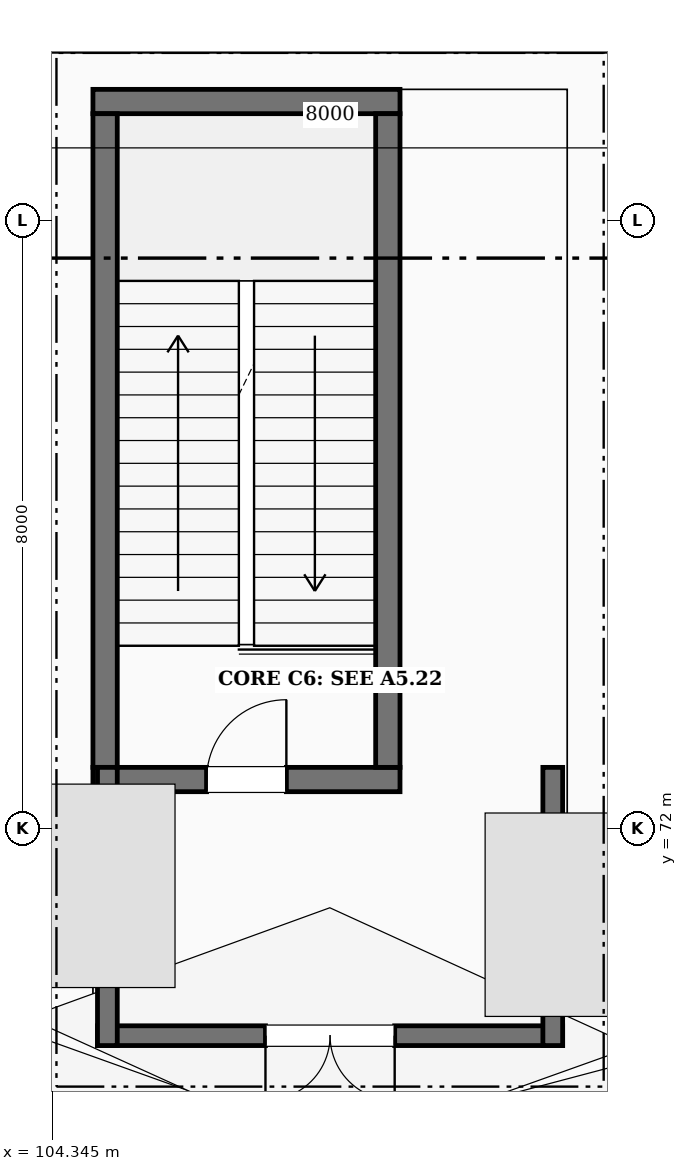
"""IFC4 building model, lengths in metres.
Left out: names, types, materials, properties, quantities, classifications, styles, units other than length and angle.
Written with IfcOpenShell. Run it as: python <this file> out.ifc"""

import sys

from ifc_helpers import new_model, si_unit, direction, frame, frame_2d, origin, place, context, subcontext, project, spatial, rectangle, extrude, element, fill, save


model = new_model("IFC4")
c1 = context("Model", 3, precision=1e-05, world=origin(), true_north=direction((0.0, 1.0)))
c2 = subcontext(c1, "Body", "Model", "MODEL_VIEW")
j1 = project(units=[si_unit("LENGTHUNIT", "METRE"), si_unit("PLANEANGLEUNIT", "RADIAN")], contexts=[c1])
p1 = place(None, origin())
s1 = spatial("IfcSite", under=j1, at=p1, CompositionType="ELEMENT")
p2 = place(p1, origin())
s2 = spatial("IfcBuilding", under=s1, at=p2, CompositionType="ELEMENT")
p3 = place(p2, frame((0.0, 0.0, 10.8)))
s3 = spatial("IfcBuildingStorey", under=s2, at=p3, CompositionType="ELEMENT", Elevation=10.8)
p4 = place(p3, frame((104.88, 72.64, 0.0), z_axis=(0.0, 0.0, 1.0), x_axis=(1.0, 0.0, 0.0)))
e1 = element("IfcWall", 1, at=p4, inside=s3, PredefinedType="SHEAR", context=c2, shape_type="SweptSolid", body=[
    extrude(rectangle(XDim=4.04, YDim=0.32, at=frame_2d((2.02, 0.0))), origin(), (0.0, 0.0, 1.0), 2.65),
])
p5 = place(p4, frame((1.495, 0.0, 0.0)))
e2 = element("IfcOpeningElement", 2, at=p5, cuts=e1, PredefinedType="OPENING", context=c2, shape_type="SweptSolid", body=[
    extrude(rectangle(XDim=1.05, YDim=2.15, at=frame_2d((0.525, 1.075))), frame((0.0, 0.17, 0.0), z_axis=(0.0, -1.0, 0.0), x_axis=(1.0, 0.0, 0.0)), (0.0, 0.0, 1.0), 0.34),
])
p6 = place(p3, frame((104.88, 81.56, 0.0), z_axis=(0.0, 0.0, 1.0), x_axis=(1.0, 0.0, 0.0)))
e3 = element("IfcWall", 3, at=p6, inside=s3, PredefinedType="SHEAR", context=c2, shape_type="SweptSolid", body=[
    extrude(rectangle(XDim=4.04, YDim=0.32, at=frame_2d((2.02, 0.0))), origin(), (0.0, 0.0, 1.0), 2.65),
])
for number, where, z_axis, x_axis in (
    (4, (105.04, 72.8, 0.0), (0.0, 0.0, 1.0), (0.0, 1.0, 0.0)),
    (5, (108.76, 72.8, 0.0), (0.0, 0.0, 1.0), (0.0, 1.0, 0.0)),
):
    element("IfcWall", number, at=place(p3, frame(where, z_axis=z_axis, x_axis=x_axis)), inside=s3, PredefinedType="SHEAR", context=c2, shape_type="SweptSolid", body=[
        extrude(rectangle(XDim=8.6, YDim=0.32, at=frame_2d((4.3, 0.0))), origin(), (0.0, 0.0, 1.0), 2.65),
    ])
p7 = place(p3, frame((111.06, 69.27, 0.0), z_axis=(0.0, 0.0, 1.0), x_axis=(-1.0, 0.0, 0.0)))
e6 = element("IfcWall", 6, at=p7, inside=s3, PredefinedType="SHEAR", context=c2, shape_type="SweptSolid", body=[
    extrude(rectangle(XDim=6.12, YDim=0.26, at=frame_2d((3.06, 0.0))), origin(), (0.0, 0.0, 1.0), 2.65),
])
p8 = place(p7, frame((2.21, 0.0, 0.0)))
e7 = element("IfcOpeningElement", 7, at=p8, cuts=e6, PredefinedType="OPENING", context=c2, shape_type="SweptSolid", body=[
    extrude(rectangle(XDim=1.7, YDim=2.2, at=frame_2d((0.85, 1.1))), frame((0.0, 0.14, 0.0), z_axis=(0.0, -1.0, 0.0), x_axis=(1.0, 0.0, 0.0)), (0.0, 0.0, 1.0), 0.28),
])
for number, where, z_axis, x_axis in (
    (8, (105.07, 69.14, 0.0), (0.0, 0.0, 1.0), (0.0, 1.0, 0.0)),
    (9, (110.93, 69.14, 0.0), (0.0, 0.0, 1.0), (0.0, 1.0, 0.0)),
):
    element("IfcWall", number, at=place(p3, frame(where, z_axis=z_axis, x_axis=x_axis)), inside=s3, PredefinedType="SHEAR", context=c2, shape_type="SweptSolid", body=[
        extrude(rectangle(XDim=3.66, YDim=0.26, at=frame_2d((1.83, 0.0))), origin(), (0.0, 0.0, 1.0), 2.65),
    ])
p9 = place(p5, origin())
e10 = element("IfcDoor", 10, at=p9, inside=s3, OperationType="SINGLE_SWING_RIGHT", PredefinedType="DOOR", context=c2, shape_type="SweptSolid", body=[
    extrude(rectangle(XDim=1.05, YDim=2.15, at=frame_2d((0.525, 1.075))), frame((0.0, 0.025, 0.0), z_axis=(0.0, -1.0, 0.0), x_axis=(1.0, 0.0, 0.0)), (0.0, 0.0, 1.0), 0.05),
])
fill(e2, e10)
p10 = place(p8, origin())
e11 = element("IfcDoor", 11, at=p10, inside=s3, OperationType="DOUBLE_DOOR_SINGLE_SWING", PredefinedType="DOOR", context=c2, shape_type="SweptSolid", body=[
    extrude(rectangle(XDim=1.7, YDim=2.2, at=frame_2d((0.85, 1.1))), frame((0.0, 0.025, 0.0), z_axis=(0.0, -1.0, 0.0), x_axis=(1.0, 0.0, 0.0)), (0.0, 0.0, 1.0), 0.05),
])
fill(e7, e11)
save(model, sys.argv[1])
